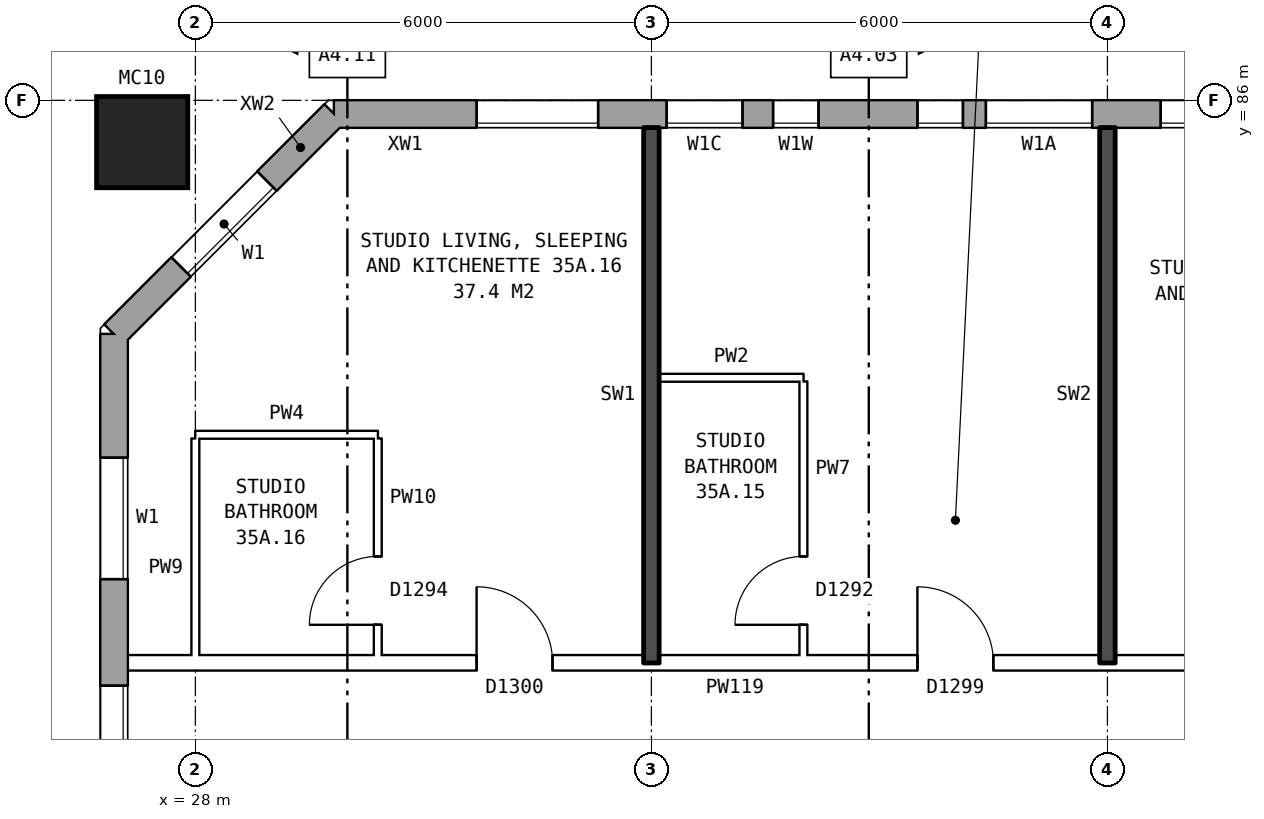
"""IFC4 building model, lengths in metres.
Left out: names, types, materials, properties, quantities, classifications, styles, units other than length and angle.
Written with IfcOpenShell. Run it as: python <this file> out.ifc"""

import sys

from ifc_helpers import new_model, si_unit, direction, frame, frame_2d, origin, origin_2d, place, context, subcontext, project, spatial, rectangle, hollow_rectangle, extrude, element, fill, save


model = new_model("IFC4")
c1 = context("Model", 3, precision=1e-05, world=origin(), true_north=direction((0.0, 1.0)))
c2 = subcontext(c1, "Body", "Model", "MODEL_VIEW")
j1 = project(units=[si_unit("LENGTHUNIT", "METRE"), si_unit("PLANEANGLEUNIT", "RADIAN")], contexts=[c1])
p1 = place(None, origin())
s1 = spatial("IfcSite", under=j1, at=p1, CompositionType="ELEMENT")
p2 = place(p1, origin())
s2 = spatial("IfcBuilding", under=s1, at=p2, CompositionType="ELEMENT")
p3 = place(p2, frame((0.0, 0.0, 126.8)))
s3 = spatial("IfcBuildingStorey", under=s2, at=p3, CompositionType="ELEMENT", Elevation=126.8)
p4 = place(p3, frame((27.3, 85.45, 0.0), z_axis=(0.0, 0.0, 1.0), x_axis=(1.0, 0.0, 0.0)))
e1 = element("IfcColumn", 1, at=p4, inside=s3, PredefinedType="COLUMN", context=c2, shape_type="SweptSolid", body=[
    extrude(hollow_rectangle(XDim=1.2, YDim=1.2, WallThickness=0.065, at=origin_2d()), origin(), (0.0, 0.0, 1.0), 3.1),
])
p5 = place(p3, frame((72.925, 85.82, 0.0), z_axis=(0.0, 0.0, 1.0), x_axis=(-1.0, 0.0, 0.0)))
e2 = element("IfcWall", 2, at=p5, inside=s3, PredefinedType="STANDARD", context=c2, shape_type="SweptSolid", body=[
    extrude(rectangle(XDim=43.101, YDim=0.36, at=frame_2d((21.55, 0.0))), origin(), (0.0, 0.0, 1.0), 2.85),
])
p6 = place(p5, frame((0.625, 0.0, 0.8)))
e3 = element("IfcOpeningElement", 3, at=p6, cuts=e2, PredefinedType="OPENING", context=c2, shape_type="SweptSolid", body=[
    extrude(rectangle(XDim=1.6, YDim=1.8, at=frame_2d((0.8, 0.9))), frame((0.0, 0.19, 0.0), z_axis=(0.0, -1.0, 0.0), x_axis=(1.0, 0.0, 0.0)), (0.0, 0.0, 1.0), 0.38),
])
p7 = place(p5, frame((3.625, 0.0, 0.8)))
e4 = element("IfcOpeningElement", 4, at=p7, cuts=e2, PredefinedType="OPENING", context=c2, shape_type="SweptSolid", body=[
    extrude(rectangle(XDim=1.6, YDim=1.8, at=frame_2d((0.8, 0.9))), frame((0.0, 0.19, 0.0), z_axis=(0.0, -1.0, 0.0), x_axis=(1.0, 0.0, 0.0)), (0.0, 0.0, 1.0), 0.38),
])
p8 = place(p5, frame((5.525, 0.0, 1.7)))
e5 = element("IfcOpeningElement", 5, at=p8, cuts=e2, PredefinedType="OPENING", context=c2, shape_type="SweptSolid", body=[
    extrude(rectangle(XDim=0.8, YDim=0.9, at=frame_2d((0.4, 0.45))), frame((0.0, 0.19, 0.0), z_axis=(0.0, -1.0, 0.0), x_axis=(1.0, 0.0, 0.0)), (0.0, 0.0, 1.0), 0.38),
])
p9 = place(p5, frame((9.625, 0.0, 0.8)))
e6 = element("IfcOpeningElement", 6, at=p9, cuts=e2, PredefinedType="OPENING", context=c2, shape_type="SweptSolid", body=[
    extrude(rectangle(XDim=1.6, YDim=1.8, at=frame_2d((0.8, 0.9))), frame((0.0, 0.19, 0.0), z_axis=(0.0, -1.0, 0.0), x_axis=(1.0, 0.0, 0.0)), (0.0, 0.0, 1.0), 0.38),
])
p10 = place(p5, frame((12.625, 0.0, 0.8)))
e7 = element("IfcOpeningElement", 7, at=p10, cuts=e2, PredefinedType="OPENING", context=c2, shape_type="SweptSolid", body=[
    extrude(rectangle(XDim=1.6, YDim=1.8, at=frame_2d((0.8, 0.9))), frame((0.0, 0.19, 0.0), z_axis=(0.0, -1.0, 0.0), x_axis=(1.0, 0.0, 0.0)), (0.0, 0.0, 1.0), 0.38),
])
p11 = place(p5, frame((15.625, 0.0, 0.8)))
e8 = element("IfcOpeningElement", 8, at=p11, cuts=e2, PredefinedType="OPENING", context=c2, shape_type="SweptSolid", body=[
    extrude(rectangle(XDim=1.6, YDim=1.8, at=frame_2d((0.8, 0.9))), frame((0.0, 0.19, 0.0), z_axis=(0.0, -1.0, 0.0), x_axis=(1.0, 0.0, 0.0)), (0.0, 0.0, 1.0), 0.38),
])
p12 = place(p5, frame((18.625, 0.0, 0.8)))
e9 = element("IfcOpeningElement", 9, at=p12, cuts=e2, PredefinedType="OPENING", context=c2, shape_type="SweptSolid", body=[
    extrude(rectangle(XDim=1.6, YDim=1.8, at=frame_2d((0.8, 0.9))), frame((0.0, 0.19, 0.0), z_axis=(0.0, -1.0, 0.0), x_axis=(1.0, 0.0, 0.0)), (0.0, 0.0, 1.0), 0.38),
])
p13 = place(p5, frame((21.625, 0.0, 0.8)))
e10 = element("IfcOpeningElement", 10, at=p13, cuts=e2, PredefinedType="OPENING", context=c2, shape_type="SweptSolid", body=[
    extrude(rectangle(XDim=1.6, YDim=1.8, at=frame_2d((0.8, 0.9))), frame((0.0, 0.19, 0.0), z_axis=(0.0, -1.0, 0.0), x_axis=(1.0, 0.0, 0.0)), (0.0, 0.0, 1.0), 0.38),
])
p14 = place(p5, frame((24.625, 0.0, 0.8)))
e11 = element("IfcOpeningElement", 11, at=p14, cuts=e2, PredefinedType="OPENING", context=c2, shape_type="SweptSolid", body=[
    extrude(rectangle(XDim=1.6, YDim=1.8, at=frame_2d((0.8, 0.9))), frame((0.0, 0.19, 0.0), z_axis=(0.0, -1.0, 0.0), x_axis=(1.0, 0.0, 0.0)), (0.0, 0.0, 1.0), 0.38),
])
p15 = place(p5, frame((27.625, 0.0, 0.8)))
e12 = element("IfcOpeningElement", 12, at=p15, cuts=e2, PredefinedType="OPENING", context=c2, shape_type="SweptSolid", body=[
    extrude(rectangle(XDim=1.6, YDim=1.8, at=frame_2d((0.8, 0.9))), frame((0.0, 0.19, 0.0), z_axis=(0.0, -1.0, 0.0), x_axis=(1.0, 0.0, 0.0)), (0.0, 0.0, 1.0), 0.38),
])
p16 = place(p5, frame((30.625, 0.0, 0.8)))
e13 = element("IfcOpeningElement", 13, at=p16, cuts=e2, PredefinedType="OPENING", context=c2, shape_type="SweptSolid", body=[
    extrude(rectangle(XDim=1.6, YDim=1.8, at=frame_2d((0.8, 0.9))), frame((0.0, 0.19, 0.0), z_axis=(0.0, -1.0, 0.0), x_axis=(1.0, 0.0, 0.0)), (0.0, 0.0, 1.0), 0.38),
])
p17 = place(p5, frame((33.125, 0.0, 0.8)))
e14 = element("IfcOpeningElement", 14, at=p17, cuts=e2, PredefinedType="OPENING", context=c2, shape_type="SweptSolid", body=[
    extrude(rectangle(XDim=1.4, YDim=1.8, at=frame_2d((0.7, 0.9))), frame((0.0, 0.19, 0.0), z_axis=(0.0, -1.0, 0.0), x_axis=(1.0, 0.0, 0.0)), (0.0, 0.0, 1.0), 0.38),
])
p18 = place(p5, frame((34.825, 0.0, 0.8)))
e15 = element("IfcOpeningElement", 15, at=p18, cuts=e2, PredefinedType="OPENING", context=c2, shape_type="SweptSolid", body=[
    extrude(rectangle(XDim=0.6, YDim=0.9, at=frame_2d((0.3, 0.45))), frame((0.0, 0.19, 0.0), z_axis=(0.0, -1.0, 0.0), x_axis=(1.0, 0.0, 0.0)), (0.0, 0.0, 1.0), 0.38),
])
p19 = place(p5, frame((39.625, 0.0, 0.8)))
e16 = element("IfcOpeningElement", 16, at=p19, cuts=e2, PredefinedType="OPENING", context=c2, shape_type="SweptSolid", body=[
    extrude(rectangle(XDim=1.6, YDim=1.8, at=frame_2d((0.8, 0.9))), frame((0.0, 0.19, 0.0), z_axis=(0.0, -1.0, 0.0), x_axis=(1.0, 0.0, 0.0)), (0.0, 0.0, 1.0), 0.38),
])
p20 = place(p5, frame((7.525, 0.0, 0.8)))
e17 = element("IfcOpeningElement", 17, at=p20, cuts=e2, PredefinedType="OPENING", context=c2, shape_type="SweptSolid", body=[
    extrude(rectangle(XDim=1.2, YDim=0.9, at=frame_2d((0.6, 0.45))), frame((0.0, 0.19, 0.0), z_axis=(0.0, -1.0, 0.0), x_axis=(1.0, 0.0, 0.0)), (0.0, 0.0, 1.0), 0.38),
])
p21 = place(p5, frame((36.725, 0.0, 1.7)))
e18 = element("IfcOpeningElement", 18, at=p21, cuts=e2, PredefinedType="OPENING", context=c2, shape_type="SweptSolid", body=[
    extrude(rectangle(XDim=0.6, YDim=0.9, at=frame_2d((0.3, 0.45))), frame((0.0, 0.19, 0.0), z_axis=(0.0, -1.0, 0.0), x_axis=(1.0, 0.0, 0.0)), (0.0, 0.0, 1.0), 0.38),
])
p22 = place(p5, frame((37.725, 0.0, 0.8)))
e19 = element("IfcOpeningElement", 19, at=p22, cuts=e2, PredefinedType="OPENING", context=c2, shape_type="SweptSolid", body=[
    extrude(rectangle(XDim=1.0, YDim=1.8, at=frame_2d((0.5, 0.9))), frame((0.0, 0.19, 0.0), z_axis=(0.0, -1.0, 0.0), x_axis=(1.0, 0.0, 0.0)), (0.0, 0.0, 1.0), 0.38),
])
p23 = place(p3, frame((29.825, 85.82, 0.0), z_axis=(0.0, 0.0, 1.0), x_axis=(-0.707106781187, -0.707106781187, 0.0)))
e20 = element("IfcWall", 20, at=p23, inside=s3, PredefinedType="STANDARD", context=c2, shape_type="SweptSolid", body=[
    extrude(rectangle(XDim=4.094, YDim=0.36, at=frame_2d((2.047, 0.0))), origin(), (0.0, 0.0, 1.0), 2.85),
])
p24 = place(p23, frame((1.247, 0.0, 0.8)))
e21 = element("IfcOpeningElement", 21, at=p24, cuts=e20, PredefinedType="OPENING", context=c2, shape_type="SweptSolid", body=[
    extrude(rectangle(XDim=1.6, YDim=1.8, at=frame_2d((0.8, 0.9))), frame((0.0, 0.19, 0.0), z_axis=(0.0, -1.0, 0.0), x_axis=(1.0, 0.0, 0.0)), (0.0, 0.0, 1.0), 0.38),
])
p25 = place(p3, frame((26.93, 82.925, 0.0), z_axis=(0.0, 0.0, 1.0), x_axis=(0.0, -1.0, 0.0)))
e22 = element("IfcWall", 22, at=p25, inside=s3, PredefinedType="STANDARD", context=c2, shape_type="SweptSolid", body=[
    extrude(rectangle(XDim=25.851, YDim=0.36, at=frame_2d((12.925, 0.0))), origin(), (0.0, 0.0, 1.0), 2.85),
])
p26 = place(p25, frame((1.625, 0.0, 0.8)))
e23 = element("IfcOpeningElement", 23, at=p26, cuts=e22, PredefinedType="OPENING", context=c2, shape_type="SweptSolid", body=[
    extrude(rectangle(XDim=1.6, YDim=1.8, at=frame_2d((0.8, 0.9))), frame((0.0, 0.19, 0.0), z_axis=(0.0, -1.0, 0.0), x_axis=(1.0, 0.0, 0.0)), (0.0, 0.0, 1.0), 0.38),
])
p27 = place(p25, frame((4.625, 0.0, 0.8)))
e24 = element("IfcOpeningElement", 24, at=p27, cuts=e22, PredefinedType="OPENING", context=c2, shape_type="SweptSolid", body=[
    extrude(rectangle(XDim=1.6, YDim=1.8, at=frame_2d((0.8, 0.9))), frame((0.0, 0.19, 0.0), z_axis=(0.0, -1.0, 0.0), x_axis=(1.0, 0.0, 0.0)), (0.0, 0.0, 1.0), 0.38),
])
p28 = place(p25, frame((6.525, 0.0, 0.8)))
e25 = element("IfcOpeningElement", 25, at=p28, cuts=e22, PredefinedType="OPENING", context=c2, shape_type="SweptSolid", body=[
    extrude(rectangle(XDim=1.2, YDim=1.8, at=frame_2d((0.6, 0.9))), frame((0.0, 0.19, 0.0), z_axis=(0.0, -1.0, 0.0), x_axis=(1.0, 0.0, 0.0)), (0.0, 0.0, 1.0), 0.38),
])
p29 = place(p25, frame((8.025, 0.0, 1.6)))
e26 = element("IfcOpeningElement", 26, at=p29, cuts=e22, PredefinedType="OPENING", context=c2, shape_type="SweptSolid", body=[
    extrude(rectangle(XDim=1.0, YDim=0.9, at=frame_2d((0.5, 0.45))), frame((0.0, 0.19, 0.0), z_axis=(0.0, -1.0, 0.0), x_axis=(1.0, 0.0, 0.0)), (0.0, 0.0, 1.0), 0.38),
])
p30 = place(p25, frame((10.075, 0.0, 0.8)))
e27 = element("IfcOpeningElement", 27, at=p30, cuts=e22, PredefinedType="OPENING", context=c2, shape_type="SweptSolid", body=[
    extrude(rectangle(XDim=1.0, YDim=0.9, at=frame_2d((0.5, 0.45))), frame((0.0, 0.19, 0.0), z_axis=(0.0, -1.0, 0.0), x_axis=(1.0, 0.0, 0.0)), (0.0, 0.0, 1.0), 0.38),
])
p31 = place(p25, frame((11.375, 0.0, 0.8)))
e28 = element("IfcOpeningElement", 28, at=p31, cuts=e22, PredefinedType="OPENING", context=c2, shape_type="SweptSolid", body=[
    extrude(rectangle(XDim=1.2, YDim=1.8, at=frame_2d((0.6, 0.9))), frame((0.0, 0.19, 0.0), z_axis=(0.0, -1.0, 0.0), x_axis=(1.0, 0.0, 0.0)), (0.0, 0.0, 1.0), 0.38),
])
p32 = place(p25, frame((19.625, 0.0, 0.8)))
e29 = element("IfcOpeningElement", 29, at=p32, cuts=e22, PredefinedType="OPENING", context=c2, shape_type="SweptSolid", body=[
    extrude(rectangle(XDim=1.6, YDim=1.8, at=frame_2d((0.8, 0.9))), frame((0.0, 0.19, 0.0), z_axis=(0.0, -1.0, 0.0), x_axis=(1.0, 0.0, 0.0)), (0.0, 0.0, 1.0), 0.38),
])
p33 = place(p25, frame((22.625, 0.0, 0.8)))
e30 = element("IfcOpeningElement", 30, at=p33, cuts=e22, PredefinedType="OPENING", context=c2, shape_type="SweptSolid", body=[
    extrude(rectangle(XDim=1.6, YDim=1.8, at=frame_2d((0.8, 0.9))), frame((0.0, 0.19, 0.0), z_axis=(0.0, -1.0, 0.0), x_axis=(1.0, 0.0, 0.0)), (0.0, 0.0, 1.0), 0.38),
])
p34 = place(p25, frame((12.875, 0.0, 0.8)))
e31 = element("IfcOpeningElement", 31, at=p34, cuts=e22, PredefinedType="OPENING", context=c2, shape_type="SweptSolid", body=[
    extrude(rectangle(XDim=1.6, YDim=1.8, at=frame_2d((0.8, 0.9))), frame((0.0, 0.19, 0.0), z_axis=(0.0, -1.0, 0.0), x_axis=(1.0, 0.0, 0.0)), (0.0, 0.0, 1.0), 0.38),
])
p35 = place(p25, frame((14.775, 0.0, 0.8)))
e32 = element("IfcOpeningElement", 32, at=p35, cuts=e22, PredefinedType="OPENING", context=c2, shape_type="SweptSolid", body=[
    extrude(rectangle(XDim=1.0, YDim=0.9, at=frame_2d((0.5, 0.45))), frame((0.0, 0.19, 0.0), z_axis=(0.0, -1.0, 0.0), x_axis=(1.0, 0.0, 0.0)), (0.0, 0.0, 1.0), 0.38),
])
p36 = place(p25, frame((16.675, 0.0, 1.7)))
e33 = element("IfcOpeningElement", 33, at=p36, cuts=e22, PredefinedType="OPENING", context=c2, shape_type="SweptSolid", body=[
    extrude(rectangle(XDim=1.0, YDim=0.9, at=frame_2d((0.5, 0.45))), frame((0.0, 0.19, 0.0), z_axis=(0.0, -1.0, 0.0), x_axis=(1.0, 0.0, 0.0)), (0.0, 0.0, 1.0), 0.38),
])
p37 = place(p25, frame((17.975, 0.0, 0.8)))
e34 = element("IfcOpeningElement", 34, at=p37, cuts=e22, PredefinedType="OPENING", context=c2, shape_type="SweptSolid", body=[
    extrude(rectangle(XDim=1.2, YDim=1.8, at=frame_2d((0.6, 0.9))), frame((0.0, 0.19, 0.0), z_axis=(0.0, -1.0, 0.0), x_axis=(1.0, 0.0, 0.0)), (0.0, 0.0, 1.0), 0.38),
])
p38 = place(p3, frame((27.11, 78.6, 0.0), z_axis=(0.0, 0.0, 1.0), x_axis=(1.0, 0.0, 0.0)))
e35 = element("IfcWall", 35, at=p38, inside=s3, PredefinedType="PARTITIONING", context=c2, shape_type="SweptSolid", body=[
    extrude(rectangle(XDim=18.79, YDim=0.2, at=frame_2d((9.395, 0.0))), origin(), (0.0, 0.0, 1.0), 2.85),
])
p39 = place(p38, frame((14.19, 0.0, 0.0)))
e36 = element("IfcOpeningElement", 36, at=p39, cuts=e35, PredefinedType="OPENING", context=c2, shape_type="SweptSolid", body=[
    extrude(rectangle(XDim=1.0, YDim=2.1, at=frame_2d((0.5, 1.05))), frame((0.0, 0.11, 0.0), z_axis=(0.0, -1.0, 0.0), x_axis=(1.0, 0.0, 0.0)), (0.0, 0.0, 1.0), 0.22),
])
p40 = place(p38, frame((10.39, 0.0, 0.0)))
e37 = element("IfcOpeningElement", 37, at=p40, cuts=e35, PredefinedType="OPENING", context=c2, shape_type="SweptSolid", body=[
    extrude(rectangle(XDim=1.0, YDim=2.1, at=frame_2d((0.5, 1.05))), frame((0.0, 0.11, 0.0), z_axis=(0.0, -1.0, 0.0), x_axis=(1.0, 0.0, 0.0)), (0.0, 0.0, 1.0), 0.22),
])
p41 = place(p38, frame((4.59, 0.0, 0.0)))
e38 = element("IfcOpeningElement", 38, at=p41, cuts=e35, PredefinedType="OPENING", context=c2, shape_type="SweptSolid", body=[
    extrude(rectangle(XDim=1.0, YDim=2.1, at=frame_2d((0.5, 1.05))), frame((0.0, 0.11, 0.0), z_axis=(0.0, -1.0, 0.0), x_axis=(1.0, 0.0, 0.0)), (0.0, 0.0, 1.0), 0.22),
])
p42 = place(p3, frame((28.0, 81.6, 0.0), z_axis=(0.0, 0.0, 1.0), x_axis=(1.0, 0.0, 0.0)))
e39 = element("IfcWall", 39, at=p42, inside=s3, PredefinedType="PARTITIONING", context=c2, shape_type="SweptSolid", body=[
    extrude(rectangle(XDim=2.4, YDim=0.1, at=frame_2d((1.2, 0.0))), origin(), (0.0, 0.0, 1.0), 2.85),
])
p43 = place(p3, frame((34.1, 82.35, 0.0), z_axis=(0.0, 0.0, 1.0), x_axis=(1.0, 0.0, 0.0)))
e40 = element("IfcWall", 40, at=p43, inside=s3, PredefinedType="PARTITIONING", context=c2, shape_type="SweptSolid", body=[
    extrude(rectangle(XDim=1.9, YDim=0.1, at=frame_2d((0.95, 0.0))), origin(), (0.0, 0.0, 1.0), 2.85),
])
p44 = place(p3, frame((28.0, 78.7, 0.0), z_axis=(0.0, 0.0, 1.0), x_axis=(0.0, 1.0, 0.0)))
e41 = element("IfcWall", 41, at=p44, inside=s3, PredefinedType="PARTITIONING", context=c2, shape_type="SweptSolid", body=[
    extrude(rectangle(XDim=2.85, YDim=0.1, at=frame_2d((1.425, 0.0))), origin(), (0.0, 0.0, 1.0), 2.85),
])
p45 = place(p3, frame((30.4, 78.7, 0.0), z_axis=(0.0, 0.0, 1.0), x_axis=(0.0, 1.0, 0.0)))
e42 = element("IfcWall", 42, at=p45, inside=s3, PredefinedType="PARTITIONING", context=c2, shape_type="SweptSolid", body=[
    extrude(rectangle(XDim=2.85, YDim=0.1, at=frame_2d((1.425, 0.0))), origin(), (0.0, 0.0, 1.0), 2.85),
])
p46 = place(p45, frame((0.4, 0.0, 0.0)))
e43 = element("IfcOpeningElement", 43, at=p46, cuts=e42, PredefinedType="OPENING", context=c2, shape_type="SweptSolid", body=[
    extrude(rectangle(XDim=0.9, YDim=2.1, at=frame_2d((0.45, 1.05))), frame((0.0, 0.06, 0.0), z_axis=(0.0, -1.0, 0.0), x_axis=(1.0, 0.0, 0.0)), (0.0, 0.0, 1.0), 0.12),
])
p47 = place(p3, frame((34.0, 78.6, 0.0), z_axis=(0.0, 0.0, 1.0), x_axis=(0.0, 1.0, 0.0)))
e44 = element("IfcWall", 44, at=p47, inside=s3, PredefinedType="SOLIDWALL", context=c2, shape_type="SweptSolid", body=[
    extrude(rectangle(XDim=7.04, YDim=0.2, at=frame_2d((3.52, 0.0))), origin(), (0.0, 0.0, 1.0), 2.85),
])
p48 = place(p3, frame((36.0, 78.7, 0.0), z_axis=(0.0, 0.0, 1.0), x_axis=(0.0, 1.0, 0.0)))
e45 = element("IfcWall", 45, at=p48, inside=s3, PredefinedType="PARTITIONING", context=c2, shape_type="SweptSolid", body=[
    extrude(rectangle(XDim=3.6, YDim=0.1, at=frame_2d((1.8, 0.0))), origin(), (0.0, 0.0, 1.0), 2.85),
])
p49 = place(p48, frame((0.4, 0.0, 0.0)))
e46 = element("IfcOpeningElement", 46, at=p49, cuts=e45, PredefinedType="OPENING", context=c2, shape_type="SweptSolid", body=[
    extrude(rectangle(XDim=0.9, YDim=2.1, at=frame_2d((0.45, 1.05))), frame((0.0, 0.06, 0.0), z_axis=(0.0, -1.0, 0.0), x_axis=(1.0, 0.0, 0.0)), (0.0, 0.0, 1.0), 0.12),
])
p50 = place(p3, frame((40.0, 78.6, 0.0), z_axis=(0.0, 0.0, 1.0), x_axis=(0.0, 1.0, 0.0)))
e47 = element("IfcWall", 47, at=p50, inside=s3, PredefinedType="SOLIDWALL", context=c2, shape_type="SweptSolid", body=[
    extrude(rectangle(XDim=7.04, YDim=0.2, at=frame_2d((3.52, 0.0))), origin(), (0.0, 0.0, 1.0), 2.85),
])
p51 = place(p16, origin())
e48 = element("IfcWindow", 48, at=p51, inside=s3, PartitioningType="SINGLE_PANEL", PredefinedType="WINDOW", context=c2, shape_type="SweptSolid", body=[
    extrude(rectangle(XDim=1.6, YDim=1.8, at=frame_2d((0.8, 0.9))), frame((0.0, 0.15, 0.0), z_axis=(0.0, -1.0, 0.0), x_axis=(1.0, 0.0, 0.0)), (0.0, 0.0, 1.0), 0.06),
])
fill(e13, e48)
p52 = place(p17, origin())
e49 = element("IfcWindow", 49, at=p52, inside=s3, PartitioningType="SINGLE_PANEL", PredefinedType="WINDOW", context=c2, shape_type="SweptSolid", body=[
    extrude(rectangle(XDim=1.4, YDim=1.8, at=frame_2d((0.7, 0.9))), frame((0.0, 0.15, 0.0), z_axis=(0.0, -1.0, 0.0), x_axis=(1.0, 0.0, 0.0)), (0.0, 0.0, 1.0), 0.06),
])
fill(e14, e49)
p53 = place(p18, origin())
e50 = element("IfcWindow", 50, at=p53, inside=s3, PartitioningType="SINGLE_PANEL", PredefinedType="WINDOW", context=c2, shape_type="SweptSolid", body=[
    extrude(rectangle(XDim=0.6, YDim=0.9, at=frame_2d((0.3, 0.45))), frame((0.0, 0.15, 0.0), z_axis=(0.0, -1.0, 0.0), x_axis=(1.0, 0.0, 0.0)), (0.0, 0.0, 1.0), 0.06),
])
fill(e15, e50)
p54 = place(p19, origin())
e51 = element("IfcWindow", 51, at=p54, inside=s3, PartitioningType="SINGLE_PANEL", PredefinedType="WINDOW", context=c2, shape_type="SweptSolid", body=[
    extrude(rectangle(XDim=1.6, YDim=1.8, at=frame_2d((0.8, 0.9))), frame((0.0, 0.15, 0.0), z_axis=(0.0, -1.0, 0.0), x_axis=(1.0, 0.0, 0.0)), (0.0, 0.0, 1.0), 0.06),
])
fill(e16, e51)
p55 = place(p24, origin())
e52 = element("IfcWindow", 52, at=p55, inside=s3, PartitioningType="SINGLE_PANEL", PredefinedType="WINDOW", context=c2, shape_type="SweptSolid", body=[
    extrude(rectangle(XDim=1.6, YDim=1.8, at=frame_2d((0.8, 0.9))), frame((0.0, 0.15, 0.0), z_axis=(0.0, -1.0, 0.0), x_axis=(1.0, 0.0, 0.0)), (0.0, 0.0, 1.0), 0.06),
])
fill(e21, e52)
p56 = place(p26, origin())
e53 = element("IfcWindow", 53, at=p56, inside=s3, PartitioningType="SINGLE_PANEL", PredefinedType="WINDOW", context=c2, shape_type="SweptSolid", body=[
    extrude(rectangle(XDim=1.6, YDim=1.8, at=frame_2d((0.8, 0.9))), frame((0.0, 0.15, 0.0), z_axis=(0.0, -1.0, 0.0), x_axis=(1.0, 0.0, 0.0)), (0.0, 0.0, 1.0), 0.06),
])
fill(e23, e53)
p57 = place(p27, origin())
e54 = element("IfcWindow", 54, at=p57, inside=s3, PartitioningType="SINGLE_PANEL", PredefinedType="WINDOW", context=c2, shape_type="SweptSolid", body=[
    extrude(rectangle(XDim=1.6, YDim=1.8, at=frame_2d((0.8, 0.9))), frame((0.0, 0.15, 0.0), z_axis=(0.0, -1.0, 0.0), x_axis=(1.0, 0.0, 0.0)), (0.0, 0.0, 1.0), 0.06),
])
fill(e24, e54)
p58 = place(p40, origin())
e55 = element("IfcDoor", 55, at=p58, inside=s3, OperationType="SINGLE_SWING_LEFT", PredefinedType="DOOR", context=c2, shape_type="SweptSolid", body=[
    extrude(rectangle(XDim=1.0, YDim=2.1, at=frame_2d((0.5, 1.05))), frame((0.0, 0.025, 0.0), z_axis=(0.0, -1.0, 0.0), x_axis=(1.0, 0.0, 0.0)), (0.0, 0.0, 1.0), 0.05),
])
fill(e37, e55)
p59 = place(p49, origin())
e56 = element("IfcDoor", 56, at=p59, inside=s3, OperationType="SINGLE_SWING_LEFT", PredefinedType="DOOR", context=c2, shape_type="SweptSolid", body=[
    extrude(rectangle(XDim=0.9, YDim=2.1, at=frame_2d((0.45, 1.05))), frame((0.0, 0.025, 0.0), z_axis=(0.0, -1.0, 0.0), x_axis=(1.0, 0.0, 0.0)), (0.0, 0.0, 1.0), 0.05),
])
fill(e46, e56)
p60 = place(p41, origin())
e57 = element("IfcDoor", 57, at=p60, inside=s3, OperationType="SINGLE_SWING_LEFT", PredefinedType="DOOR", context=c2, shape_type="SweptSolid", body=[
    extrude(rectangle(XDim=1.0, YDim=2.1, at=frame_2d((0.5, 1.05))), frame((0.0, 0.025, 0.0), z_axis=(0.0, -1.0, 0.0), x_axis=(1.0, 0.0, 0.0)), (0.0, 0.0, 1.0), 0.05),
])
fill(e38, e57)
p61 = place(p46, origin())
e58 = element("IfcDoor", 58, at=p61, inside=s3, OperationType="SINGLE_SWING_LEFT", PredefinedType="DOOR", context=c2, shape_type="SweptSolid", body=[
    extrude(rectangle(XDim=0.9, YDim=2.1, at=frame_2d((0.45, 1.05))), frame((0.0, 0.025, 0.0), z_axis=(0.0, -1.0, 0.0), x_axis=(1.0, 0.0, 0.0)), (0.0, 0.0, 1.0), 0.05),
])
fill(e43, e58)
p62 = place(p21, origin())
e59 = element("IfcWindow", 59, at=p62, inside=s3, PartitioningType="SINGLE_PANEL", PredefinedType="WINDOW", context=c2, shape_type="SweptSolid", body=[
    extrude(rectangle(XDim=0.6, YDim=0.9, at=frame_2d((0.3, 0.45))), frame((0.0, 0.15, 0.0), z_axis=(0.0, -1.0, 0.0), x_axis=(1.0, 0.0, 0.0)), (0.0, 0.0, 1.0), 0.06),
])
fill(e18, e59)
p63 = place(p22, origin())
e60 = element("IfcWindow", 60, at=p63, inside=s3, PartitioningType="SINGLE_PANEL", PredefinedType="WINDOW", context=c2, shape_type="SweptSolid", body=[
    extrude(rectangle(XDim=1.0, YDim=1.8, at=frame_2d((0.5, 0.9))), frame((0.0, 0.15, 0.0), z_axis=(0.0, -1.0, 0.0), x_axis=(1.0, 0.0, 0.0)), (0.0, 0.0, 1.0), 0.06),
])
fill(e19, e60)
save(model, sys.argv[1])
